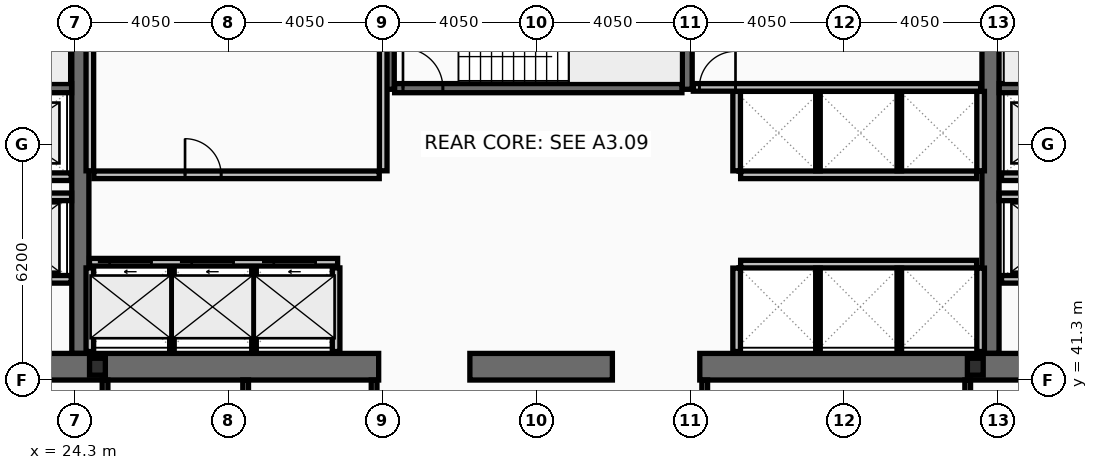
"""IFC4 building model, lengths in metres.
Left out: names, types, materials, properties, quantities, classifications, styles, units other than length and angle.
Written with IfcOpenShell. Run it as: python <this file> out.ifc"""

import sys

from ifc_helpers import new_model, si_unit, direction, frame, frame_2d, origin, origin_2d, place, context, subcontext, project, spatial, rectangle, i_section, extrude, element, fill, save


model = new_model("IFC4")
c1 = context("Model", 3, precision=1e-05, world=origin(), true_north=direction((0.0, 1.0)))
c2 = subcontext(c1, "Body", "Model", "MODEL_VIEW")
j1 = project(units=[si_unit("LENGTHUNIT", "METRE"), si_unit("PLANEANGLEUNIT", "RADIAN")], contexts=[c1])
p1 = place(None, origin())
s1 = spatial("IfcSite", under=j1, at=p1, CompositionType="ELEMENT")
p2 = place(p1, origin())
s2 = spatial("IfcBuilding", under=s1, at=p2, CompositionType="ELEMENT")
p3 = place(p2, frame((0.0, 0.0, 136.2)))
s3 = spatial("IfcBuildingStorey", under=s2, at=p3, CompositionType="ELEMENT", Elevation=136.2)
for number, where, z_axis, x_axis in (
    (1, (24.45, 42.0, 0.0), (0.0, 0.0, 1.0), (0.0, 1.0, 0.0)),
    (2, (48.4, 42.0, 0.0), (0.0, 0.0, 1.0), (0.0, 1.0, 0.0)),
):
    element("IfcWall", number, at=place(p3, frame(where, z_axis=z_axis, x_axis=x_axis)), inside=s3, PredefinedType="SHEAR", context=c2, shape_type="SweptSolid", body=[
        extrude(rectangle(XDim=11.0, YDim=0.45, at=frame_2d((5.5, 0.0))), origin(), (0.0, 0.0, 1.0), 3.44),
    ])
p4 = place(p3, frame((32.3, 41.65, 0.0), z_axis=(0.0, 0.0, 1.0), x_axis=(-1.0, 0.0, 0.0)))
e3 = element("IfcWall", 3, at=p4, inside=s3, PredefinedType="SHEAR", context=c2, shape_type="SweptSolid", body=[
    extrude(rectangle(XDim=11.45, YDim=0.7, at=frame_2d((5.725, 0.0))), origin(), (0.0, 0.0, 1.0), 3.44),
])
p5 = place(p3, frame((38.45, 41.65, 0.0), z_axis=(0.0, 0.0, 1.0), x_axis=(-1.0, 0.0, 0.0)))
e4 = element("IfcWall", 4, at=p5, inside=s3, PredefinedType="SHEAR", context=c2, shape_type="SweptSolid", body=[
    extrude(rectangle(XDim=3.75, YDim=0.7, at=frame_2d((1.875, 0.0))), origin(), (0.0, 0.0, 1.0), 3.44),
])
p6 = place(p3, frame((52.05, 41.65, 0.0), z_axis=(0.0, 0.0, 1.0), x_axis=(-1.0, 0.0, 0.0)))
e5 = element("IfcWall", 5, at=p6, inside=s3, PredefinedType="SHEAR", context=c2, shape_type="SweptSolid", body=[
    extrude(rectangle(XDim=11.3, YDim=0.7, at=frame_2d((5.65, 0.0))), origin(), (0.0, 0.0, 1.0), 3.44),
])
for number, where, z_axis, x_axis in (
    (6, (32.58, 48.95, 0.0), (0.0, 0.0, 1.0), (0.0, 1.0, 0.0)),
    (7, (40.42, 48.95, 0.0), (0.0, 0.0, 1.0), (0.0, 1.0, 0.0)),
):
    element("IfcWall", number, at=place(p3, frame(where, z_axis=z_axis, x_axis=x_axis)), inside=s3, PredefinedType="SHEAR", context=c2, shape_type="SweptSolid", body=[
        extrude(rectangle(XDim=4.05, YDim=0.26, at=frame_2d((2.025, 0.0))), origin(), (0.0, 0.0, 1.0), 3.44),
    ])
p7 = place(p3, frame((16.9, 48.98, 0.0), z_axis=(0.0, 0.0, 1.0), x_axis=(1.0, 0.0, 0.0)))
e8 = element("IfcWall", 8, at=p7, inside=s3, PredefinedType="SHEAR", context=c2, shape_type="SweptSolid", body=[
    extrude(rectangle(XDim=7.32, YDim=0.24, at=frame_2d((3.66, 0.0))), origin(), (0.0, 0.0, 1.0), 3.44),
])
p8 = place(p7, frame((0.22, 0.0, 0.0)))
e9 = element("IfcOpeningElement", 9, at=p8, cuts=e8, PredefinedType="OPENING", context=c2, shape_type="SweptSolid", body=[
    extrude(rectangle(XDim=1.05, YDim=2.15, at=frame_2d((0.525, 1.075))), frame((0.0, 0.13, 0.0), z_axis=(0.0, -1.0, 0.0), x_axis=(1.0, 0.0, 0.0)), (0.0, 0.0, 1.0), 0.26),
])
p9 = place(p3, frame((48.63, 48.98, 0.0), z_axis=(0.0, 0.0, 1.0), x_axis=(1.0, 0.0, 0.0)))
e10 = element("IfcWall", 10, at=p9, inside=s3, PredefinedType="SHEAR", context=c2, shape_type="SweptSolid", body=[
    extrude(rectangle(XDim=7.37, YDim=0.24, at=frame_2d((3.685, 0.0))), origin(), (0.0, 0.0, 1.0), 3.44),
])
p10 = place(p9, frame((6.1, 0.0, 0.0)))
e11 = element("IfcOpeningElement", 11, at=p10, cuts=e10, PredefinedType="OPENING", context=c2, shape_type="SweptSolid", body=[
    extrude(rectangle(XDim=1.05, YDim=2.15, at=frame_2d((0.525, 1.075))), frame((0.0, 0.13, 0.0), z_axis=(0.0, -1.0, 0.0), x_axis=(1.0, 0.0, 0.0)), (0.0, 0.0, 1.0), 0.26),
])
p11 = place(p3, frame((32.72, 48.98, 0.0), z_axis=(0.0, 0.0, 1.0), x_axis=(1.0, 0.0, 0.0)))
e12 = element("IfcWall", 12, at=p11, inside=s3, PredefinedType="SHEAR", context=c2, shape_type="SweptSolid", body=[
    extrude(rectangle(XDim=7.56, YDim=0.24, at=frame_2d((3.78, 0.0))), origin(), (0.0, 0.0, 1.0), 3.44),
])
p12 = place(p11, frame((0.22, 0.0, 0.0)))
e13 = element("IfcOpeningElement", 13, at=p12, cuts=e12, PredefinedType="OPENING", context=c2, shape_type="SweptSolid", body=[
    extrude(rectangle(XDim=1.05, YDim=2.15, at=frame_2d((0.525, 1.075))), frame((0.0, 0.13, 0.0), z_axis=(0.0, -1.0, 0.0), x_axis=(1.0, 0.0, 0.0)), (0.0, 0.0, 1.0), 0.26),
])
for number, where, z_axis, x_axis in (
    (14, (24.9, 41.65, 0.0), (0.0, 0.0, 1.0), (1.0, 0.0, 0.0)),
    (15, (48.0, 41.65, 0.0), (0.0, 0.0, 1.0), (1.0, 0.0, 0.0)),
):
    element("IfcColumn", number, at=place(p3, frame(where, z_axis=z_axis, x_axis=x_axis)), inside=s3, PredefinedType="COLUMN", context=c2, shape_type="SweptSolid", body=[
        extrude(i_section(OverallWidth=0.416, OverallDepth=0.446, WebThickness=0.039, FlangeThickness=0.063, at=origin_2d()), origin(), (0.0, 0.0, 1.0), 3.6),
    ])
p13 = place(p3, frame((24.69, 44.4, 0.0), z_axis=(0.0, 0.0, 1.0), x_axis=(1.0, 0.0, 0.0)))
e16 = element("IfcWall", 16, at=p13, inside=s3, PredefinedType="PARTITIONING", context=c2, shape_type="SweptSolid", body=[
    extrude(rectangle(XDim=6.53, YDim=0.2, at=frame_2d((3.265, 0.0))), origin(), (0.0, 0.0, 1.0), 3.44),
])
p14 = place(p13, frame((0.53, 0.0, 0.0)))
e17 = element("IfcOpeningElement", 17, at=p14, cuts=e16, PredefinedType="OPENING", context=c2, shape_type="SweptSolid", body=[
    extrude(rectangle(XDim=1.1, YDim=2.18, at=frame_2d((0.55, 1.09))), frame((0.0, 0.11, 0.0), z_axis=(0.0, -1.0, 0.0), x_axis=(1.0, 0.0, 0.0)), (0.0, 0.0, 1.0), 0.22),
])
p15 = place(p13, frame((2.69, 0.0, 0.0)))
e18 = element("IfcOpeningElement", 18, at=p15, cuts=e16, PredefinedType="OPENING", context=c2, shape_type="SweptSolid", body=[
    extrude(rectangle(XDim=1.1, YDim=2.18, at=frame_2d((0.55, 1.09))), frame((0.0, 0.11, 0.0), z_axis=(0.0, -1.0, 0.0), x_axis=(1.0, 0.0, 0.0)), (0.0, 0.0, 1.0), 0.22),
])
p16 = place(p13, frame((4.85, 0.0, 0.0)))
e19 = element("IfcOpeningElement", 19, at=p16, cuts=e16, PredefinedType="OPENING", context=c2, shape_type="SweptSolid", body=[
    extrude(rectangle(XDim=1.1, YDim=2.18, at=frame_2d((0.55, 1.09))), frame((0.0, 0.11, 0.0), z_axis=(0.0, -1.0, 0.0), x_axis=(1.0, 0.0, 0.0)), (0.0, 0.0, 1.0), 0.22),
])
p17 = place(p3, frame((51.61, 43.95, 0.0), z_axis=(0.0, 0.0, 1.0), x_axis=(-1.0, 0.0, 0.0)))
e20 = element("IfcWall", 20, at=p17, inside=s3, PredefinedType="PARTITIONING", context=c2, shape_type="SweptSolid", body=[
    extrude(rectangle(XDim=2.92, YDim=0.2, at=frame_2d((1.46, 0.0))), origin(), (0.0, 0.0, 1.0), 3.44),
])
p18 = place(p17, frame((0.81, 0.0, 0.0)))
e21 = element("IfcOpeningElement", 21, at=p18, cuts=e20, PredefinedType="OPENING", context=c2, shape_type="SweptSolid", body=[
    extrude(rectangle(XDim=1.3, YDim=2.18, at=frame_2d((0.65, 1.09))), frame((0.0, 0.11, 0.0), z_axis=(0.0, -1.0, 0.0), x_axis=(1.0, 0.0, 0.0)), (0.0, 0.0, 1.0), 0.22),
])
p19 = place(p3, frame((24.21, 43.95, 0.0), z_axis=(0.0, 0.0, 1.0), x_axis=(-1.0, 0.0, 0.0)))
e22 = element("IfcWall", 22, at=p19, inside=s3, PredefinedType="PARTITIONING", context=c2, shape_type="SweptSolid", body=[
    extrude(rectangle(XDim=2.97, YDim=0.2, at=frame_2d((1.485, 0.0))), origin(), (0.0, 0.0, 1.0), 3.44),
])
p20 = place(p19, frame((0.86, 0.0, 0.0)))
e23 = element("IfcOpeningElement", 23, at=p20, cuts=e22, PredefinedType="OPENING", context=c2, shape_type="SweptSolid", body=[
    extrude(rectangle(XDim=1.3, YDim=2.18, at=frame_2d((0.65, 1.09))), frame((0.0, 0.11, 0.0), z_axis=(0.0, -1.0, 0.0), x_axis=(1.0, 0.0, 0.0)), (0.0, 0.0, 1.0), 0.22),
])
p21 = place(p3, frame((51.61, 46.65, 0.0), z_axis=(0.0, 0.0, 1.0), x_axis=(-1.0, 0.0, 0.0)))
e24 = element("IfcWall", 24, at=p21, inside=s3, PredefinedType="PARTITIONING", context=c2, shape_type="SweptSolid", body=[
    extrude(rectangle(XDim=2.92, YDim=0.2, at=frame_2d((1.46, 0.0))), origin(), (0.0, 0.0, 1.0), 3.44),
])
p22 = place(p21, frame((0.86, 0.0, 0.0)))
e25 = element("IfcOpeningElement", 25, at=p22, cuts=e24, PredefinedType="OPENING", context=c2, shape_type="SweptSolid", body=[
    extrude(rectangle(XDim=1.2, YDim=2.18, at=frame_2d((0.6, 1.09))), frame((0.0, 0.11, 0.0), z_axis=(0.0, -1.0, 0.0), x_axis=(1.0, 0.0, 0.0)), (0.0, 0.0, 1.0), 0.22),
])
p23 = place(p3, frame((24.21, 46.65, 0.0), z_axis=(0.0, 0.0, 1.0), x_axis=(-1.0, 0.0, 0.0)))
e26 = element("IfcWall", 26, at=p23, inside=s3, PredefinedType="PARTITIONING", context=c2, shape_type="SweptSolid", body=[
    extrude(rectangle(XDim=2.97, YDim=0.2, at=frame_2d((1.485, 0.0))), origin(), (0.0, 0.0, 1.0), 3.44),
])
p24 = place(p23, frame((0.91, 0.0, 0.0)))
e27 = element("IfcOpeningElement", 27, at=p24, cuts=e26, PredefinedType="OPENING", context=c2, shape_type="SweptSolid", body=[
    extrude(rectangle(XDim=1.2, YDim=2.18, at=frame_2d((0.6, 1.09))), frame((0.0, 0.11, 0.0), z_axis=(0.0, -1.0, 0.0), x_axis=(1.0, 0.0, 0.0)), (0.0, 0.0, 1.0), 0.22),
])
p25 = place(p3, frame((21.2, 46.12, 0.0), z_axis=(0.0, 0.0, 1.0), x_axis=(1.0, 0.0, 0.0)))
e28 = element("IfcWall", 28, at=p25, inside=s3, PredefinedType="PARTITIONING", context=c2, shape_type="SweptSolid", body=[
    extrude(rectangle(XDim=3.02, YDim=0.2, at=frame_2d((1.51, 0.0))), origin(), (0.0, 0.0, 1.0), 3.44),
])
p26 = place(p3, frame((48.63, 46.12, 0.0), z_axis=(0.0, 0.0, 1.0), x_axis=(1.0, 0.0, 0.0)))
e29 = element("IfcWall", 29, at=p26, inside=s3, PredefinedType="PARTITIONING", context=c2, shape_type="SweptSolid", body=[
    extrude(rectangle(XDim=3.07, YDim=0.2, at=frame_2d((1.535, 0.0))), origin(), (0.0, 0.0, 1.0), 3.44),
])
for number, where, z_axis, x_axis in (
    (30, (24.7, 46.805, 0.0), (0.0, 0.0, 1.0), (0.0, 1.0, 0.0)),
    (31, (32.42, 46.805, 0.0), (0.0, 0.0, 1.0), (0.0, 1.0, 0.0)),
):
    element("IfcWall", number, at=place(p3, frame(where, z_axis=z_axis, x_axis=x_axis)), inside=s3, PredefinedType="PARTITIONING", context=c2, shape_type="SweptSolid", body=[
        extrude(rectangle(XDim=5.99, YDim=0.2, at=frame_2d((2.995, 0.0))), origin(), (0.0, 0.0, 1.0), 3.44),
    ])
p27 = place(p3, frame((24.805, 46.7, 0.0), z_axis=(0.0, 0.0, 1.0), x_axis=(1.0, 0.0, 0.0)))
e32 = element("IfcWall", 32, at=p27, inside=s3, PredefinedType="PARTITIONING", context=c2, shape_type="SweptSolid", body=[
    extrude(rectangle(XDim=7.51, YDim=0.2, at=frame_2d((3.755, 0.0))), origin(), (0.0, 0.0, 1.0), 3.44),
])
p28 = place(p27, frame((2.4, 0.0, 0.0)))
e33 = element("IfcOpeningElement", 33, at=p28, cuts=e32, PredefinedType="OPENING", context=c2, shape_type="SweptSolid", body=[
    extrude(rectangle(XDim=0.95, YDim=2.1, at=frame_2d((0.475, 1.05))), frame((0.0, 0.11, 0.0), z_axis=(0.0, -1.0, 0.0), x_axis=(1.0, 0.0, 0.0)), (0.0, 0.0, 1.0), 0.22),
])
for number, where, z_axis, x_axis in (
    (34, (24.7, 42.05, 0.0), (0.0, 0.0, 1.0), (0.0, 1.0, 0.0)),
    (35, (31.18, 42.05, 0.0), (0.0, 0.0, 1.0), (0.0, 1.0, 0.0)),
):
    element("IfcWall", number, at=place(p3, frame(where, z_axis=z_axis, x_axis=x_axis)), inside=s3, PredefinedType="PARTITIONING", context=c2, shape_type="SweptSolid", body=[
        extrude(rectangle(XDim=2.2, YDim=0.2, at=frame_2d((1.1, 0.0))), origin(), (0.0, 0.0, 1.0), 3.44),
    ])
for number, where, z_axis, x_axis in (
    (36, (26.86, 42.05, 0.0), (0.0, 0.0, 1.0), (0.0, 1.0, 0.0)),
    (37, (29.02, 42.05, 0.0), (0.0, 0.0, 1.0), (0.0, 1.0, 0.0)),
):
    element("IfcWall", number, at=place(p3, frame(where, z_axis=z_axis, x_axis=x_axis)), inside=s3, PredefinedType="PARTITIONING", context=c2, shape_type="SweptSolid", body=[
        extrude(rectangle(XDim=2.2, YDim=0.12, at=frame_2d((1.1, 0.0))), origin(), (0.0, 0.0, 1.0), 3.44),
    ])
p29 = place(p3, frame((41.825, 46.7, 0.0), z_axis=(0.0, 0.0, 1.0), x_axis=(1.0, 0.0, 0.0)))
e38 = element("IfcWall", 38, at=p29, inside=s3, PredefinedType="PARTITIONING", context=c2, shape_type="SweptSolid", body=[
    extrude(rectangle(XDim=6.21, YDim=0.2, at=frame_2d((3.105, 0.0))), origin(), (0.0, 0.0, 1.0), 3.44),
])
for number, where, z_axis, x_axis in (
    (39, (41.72, 46.805, 0.0), (0.0, 0.0, 1.0), (0.0, 1.0, 0.0)),
    (40, (48.14, 46.805, 0.0), (0.0, 0.0, 1.0), (0.0, 1.0, 0.0)),
):
    element("IfcWall", number, at=place(p3, frame(where, z_axis=z_axis, x_axis=x_axis)), inside=s3, PredefinedType="PARTITIONING", context=c2, shape_type="SweptSolid", body=[
        extrude(rectangle(XDim=2.09, YDim=0.2, at=frame_2d((1.045, 0.0))), origin(), (0.0, 0.0, 1.0), 3.44),
    ])
for number, where, z_axis, x_axis in (
    (41, (43.86, 46.805, 0.0), (0.0, 0.0, 1.0), (0.0, 1.0, 0.0)),
    (42, (46.0, 46.805, 0.0), (0.0, 0.0, 1.0), (0.0, 1.0, 0.0)),
):
    element("IfcWall", number, at=place(p3, frame(where, z_axis=z_axis, x_axis=x_axis)), inside=s3, PredefinedType="PARTITIONING", context=c2, shape_type="SweptSolid", body=[
        extrude(rectangle(XDim=2.09, YDim=0.12, at=frame_2d((1.045, 0.0))), origin(), (0.0, 0.0, 1.0), 3.44),
    ])
p30 = place(p3, frame((41.825, 44.35, 0.0), z_axis=(0.0, 0.0, 1.0), x_axis=(1.0, 0.0, 0.0)))
e43 = element("IfcWall", 43, at=p30, inside=s3, PredefinedType="PARTITIONING", context=c2, shape_type="SweptSolid", body=[
    extrude(rectangle(XDim=6.21, YDim=0.2, at=frame_2d((3.105, 0.0))), origin(), (0.0, 0.0, 1.0), 3.44),
])
for number, where, z_axis, x_axis in (
    (44, (41.72, 42.05, 0.0), (0.0, 0.0, 1.0), (0.0, 1.0, 0.0)),
    (45, (48.14, 42.05, 0.0), (0.0, 0.0, 1.0), (0.0, 1.0, 0.0)),
):
    element("IfcWall", number, at=place(p3, frame(where, z_axis=z_axis, x_axis=x_axis)), inside=s3, PredefinedType="PARTITIONING", context=c2, shape_type="SweptSolid", body=[
        extrude(rectangle(XDim=2.195, YDim=0.2, at=frame_2d((1.098, 0.0))), origin(), (0.0, 0.0, 1.0), 3.44),
    ])
for number, where, z_axis, x_axis in (
    (46, (43.86, 42.05, 0.0), (0.0, 0.0, 1.0), (0.0, 1.0, 0.0)),
    (47, (46.0, 42.05, 0.0), (0.0, 0.0, 1.0), (0.0, 1.0, 0.0)),
):
    element("IfcWall", number, at=place(p3, frame(where, z_axis=z_axis, x_axis=x_axis)), inside=s3, PredefinedType="PARTITIONING", context=c2, shape_type="SweptSolid", body=[
        extrude(rectangle(XDim=2.195, YDim=0.12, at=frame_2d((1.098, 0.0))), origin(), (0.0, 0.0, 1.0), 3.44),
    ])
p31 = place(p3, frame((40.58, 49.0, 0.0), z_axis=(0.0, 0.0, 1.0), x_axis=(1.0, 0.0, 0.0)))
e48 = element("IfcWall", 48, at=p31, inside=s3, PredefinedType="PARTITIONING", context=c2, shape_type="SweptSolid", body=[
    extrude(rectangle(XDim=7.56, YDim=0.2, at=frame_2d((3.78, 0.0))), origin(), (0.0, 0.0, 1.0), 3.44),
])
p32 = place(p31, frame((0.16, 0.0, 0.0)))
e49 = element("IfcOpeningElement", 49, at=p32, cuts=e48, PredefinedType="OPENING", context=c2, shape_type="SweptSolid", body=[
    extrude(rectangle(XDim=0.95, YDim=2.1, at=frame_2d((0.475, 1.05))), frame((0.0, 0.11, 0.0), z_axis=(0.0, -1.0, 0.0), x_axis=(1.0, 0.0, 0.0)), (0.0, 0.0, 1.0), 0.22),
])
p33 = place(p3, frame((25.1, 38.28, 0.0), z_axis=(0.0, 0.0, 1.0), x_axis=(0.0, 1.0, 0.0)))
e50 = element("IfcWall", 50, at=p33, inside=s3, PredefinedType="PARTITIONING", context=c2, shape_type="SweptSolid", body=[
    extrude(rectangle(XDim=3.02, YDim=0.15, at=frame_2d((1.51, 0.0))), origin(), (0.0, 0.0, 1.0), 2.73),
])
for number, where, z_axis, x_axis in (
    (51, (28.8, 38.28, 0.0), (0.0, 0.0, 1.0), (0.0, 1.0, 0.0)),
    (52, (32.18, 38.28, 0.0), (0.0, 0.0, 1.0), (0.0, 1.0, 0.0)),
    (53, (40.88, 38.28, 0.0), (0.0, 0.0, 1.0), (0.0, 1.0, 0.0)),
):
    element("IfcWall", number, at=place(p3, frame(where, z_axis=z_axis, x_axis=x_axis)), inside=s3, PredefinedType="PARTITIONING", context=c2, shape_type="SweptSolid", body=[
        extrude(rectangle(XDim=3.02, YDim=0.15, at=frame_2d((1.51, 0.0))), origin(), (0.0, 0.0, 1.0), 3.44),
    ])
p34 = place(p3, frame((47.8, 38.28, 0.0), z_axis=(0.0, 0.0, 1.0), x_axis=(0.0, 1.0, 0.0)))
e54 = element("IfcWall", 54, at=p34, inside=s3, PredefinedType="PARTITIONING", context=c2, shape_type="SweptSolid", body=[
    extrude(rectangle(XDim=3.02, YDim=0.15, at=frame_2d((1.51, 0.0))), origin(), (0.0, 0.0, 1.0), 2.73),
])
p35 = place(p12, origin())
e55 = element("IfcDoor", 55, at=p35, inside=s3, OperationType="SINGLE_SWING_LEFT", PredefinedType="DOOR", context=c2, shape_type="SweptSolid", body=[
    extrude(rectangle(XDim=1.05, YDim=2.15, at=frame_2d((0.525, 1.075))), frame((0.0, 0.025, 0.0), z_axis=(0.0, -1.0, 0.0), x_axis=(1.0, 0.0, 0.0)), (0.0, 0.0, 1.0), 0.05),
])
fill(e13, e55)
p36 = place(p14, origin())
e56 = element("IfcDoor", 56, at=p36, inside=s3, OperationType="SLIDING_TO_LEFT", PredefinedType="DOOR", context=c2, shape_type="SweptSolid", body=[
    extrude(rectangle(XDim=1.1, YDim=2.18, at=frame_2d((0.55, 1.09))), frame((0.0, 0.025, 0.0), z_axis=(0.0, -1.0, 0.0), x_axis=(1.0, 0.0, 0.0)), (0.0, 0.0, 1.0), 0.05),
])
fill(e17, e56)
p37 = place(p15, origin())
e57 = element("IfcDoor", 57, at=p37, inside=s3, OperationType="SLIDING_TO_LEFT", PredefinedType="DOOR", context=c2, shape_type="SweptSolid", body=[
    extrude(rectangle(XDim=1.1, YDim=2.18, at=frame_2d((0.55, 1.09))), frame((0.0, 0.025, 0.0), z_axis=(0.0, -1.0, 0.0), x_axis=(1.0, 0.0, 0.0)), (0.0, 0.0, 1.0), 0.05),
])
fill(e18, e57)
p38 = place(p16, origin())
e58 = element("IfcDoor", 58, at=p38, inside=s3, OperationType="SLIDING_TO_LEFT", PredefinedType="DOOR", context=c2, shape_type="SweptSolid", body=[
    extrude(rectangle(XDim=1.1, YDim=2.18, at=frame_2d((0.55, 1.09))), frame((0.0, 0.025, 0.0), z_axis=(0.0, -1.0, 0.0), x_axis=(1.0, 0.0, 0.0)), (0.0, 0.0, 1.0), 0.05),
])
fill(e19, e58)
p39 = place(p28, origin())
e59 = element("IfcDoor", 59, at=p39, inside=s3, OperationType="SINGLE_SWING_LEFT", PredefinedType="DOOR", context=c2, shape_type="SweptSolid", body=[
    extrude(rectangle(XDim=0.95, YDim=2.1, at=frame_2d((0.475, 1.05))), frame((0.0, 0.025, 0.0), z_axis=(0.0, -1.0, 0.0), x_axis=(1.0, 0.0, 0.0)), (0.0, 0.0, 1.0), 0.05),
])
fill(e33, e59)
p40 = place(p32, origin())
e60 = element("IfcDoor", 60, at=p40, inside=s3, OperationType="SINGLE_SWING_RIGHT", PredefinedType="DOOR", context=c2, shape_type="SweptSolid", body=[
    extrude(rectangle(XDim=0.95, YDim=2.1, at=frame_2d((0.475, 1.05))), frame((0.0, 0.025, 0.0), z_axis=(0.0, -1.0, 0.0), x_axis=(1.0, 0.0, 0.0)), (0.0, 0.0, 1.0), 0.05),
])
fill(e49, e60)
save(model, sys.argv[1])
